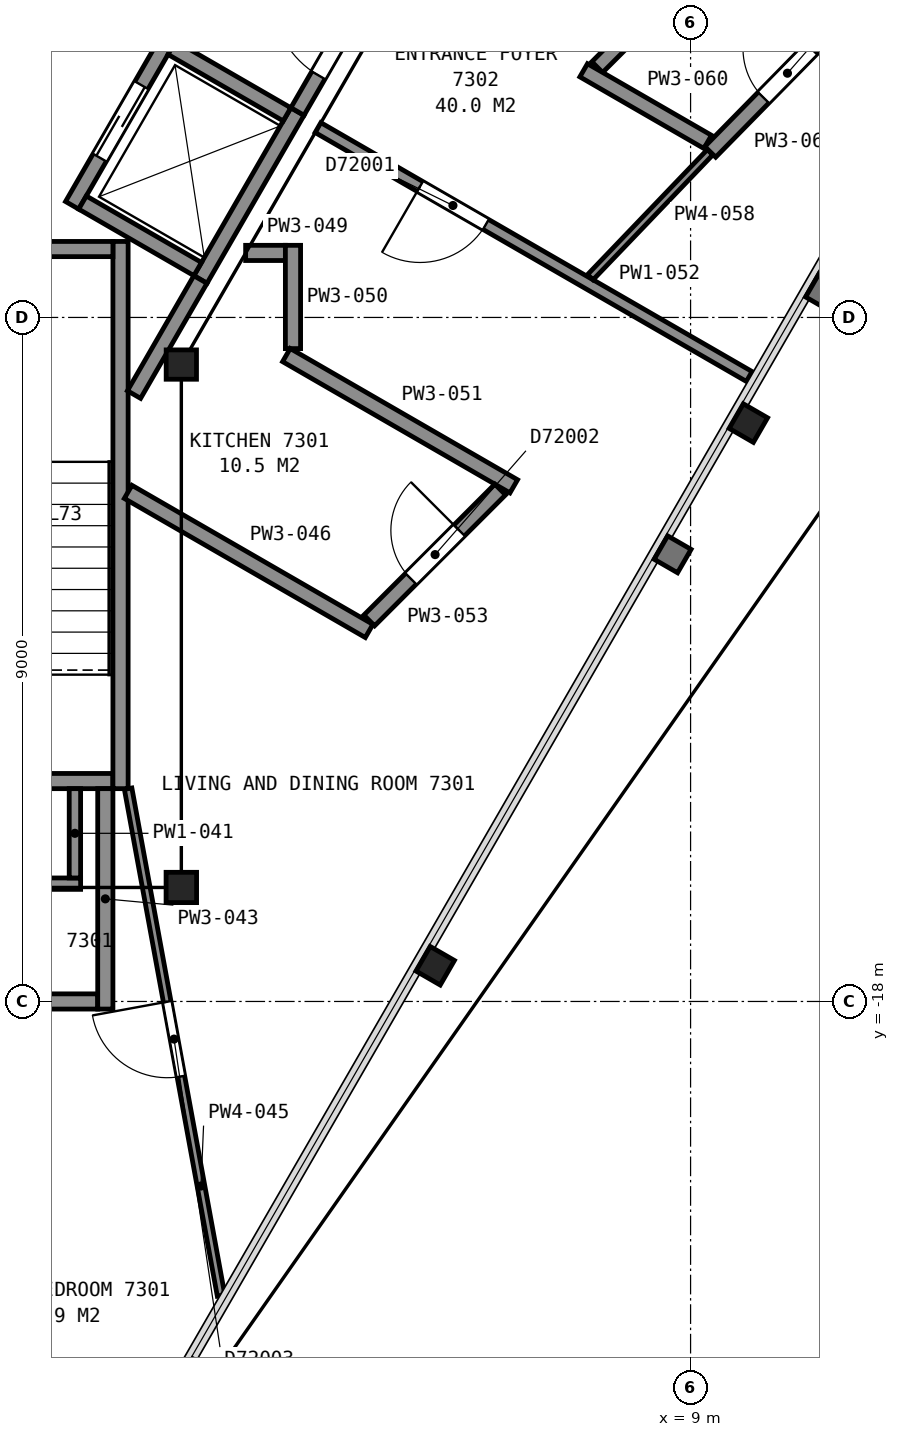
"""IFC4 building model, lengths in metres.
Left out: names, types, materials, properties, quantities, classifications, styles, units other than length and angle.
Written with IfcOpenShell. Run it as: python <this file> out.ifc"""

import sys

from ifc_helpers import new_model, si_unit, direction, frame, frame_2d, origin, origin_2d, place, context, subcontext, project, spatial, rectangle, i_section, extrude, element, fill, save


model = new_model("IFC4")
c1 = context("Model", 3, precision=1e-05, world=origin(), true_north=direction((0.0, 1.0)))
c2 = subcontext(c1, "Body", "Model", "MODEL_VIEW")
j1 = project(units=[si_unit("LENGTHUNIT", "METRE"), si_unit("PLANEANGLEUNIT", "RADIAN")], contexts=[c1])
p1 = place(None, origin())
s1 = spatial("IfcSite", under=j1, at=p1, CompositionType="ELEMENT")
p2 = place(p1, origin())
s2 = spatial("IfcBuilding", under=s1, at=p2, CompositionType="ELEMENT")
p3 = place(p2, frame((0.0, 0.0, 289.9)))
s3 = spatial("IfcBuildingStorey", under=s2, at=p3, CompositionType="ELEMENT", Elevation=289.9)
for number, where, z_axis, x_axis in (
    (1, (5.64, -17.53, 0.0), (0.0, 0.0, 1.0), (-0.5, -0.866, 0.0)),
    (2, (9.76, -10.39, 0.0), (0.0, 0.0, 1.0), (-0.5, -0.866, 0.0)),
):
    element("IfcColumn", number, at=place(p3, frame(where, z_axis=z_axis, x_axis=x_axis)), inside=s3, PredefinedType="COLUMN", context=c2, shape_type="SweptSolid", body=[
        extrude(i_section(OverallWidth=0.373, OverallDepth=0.368, WebThickness=0.015, FlangeThickness=0.024, FilletRadius=0.015, at=origin_2d()), origin(), (0.0, 0.0, 1.0), 3.7),
    ])
p4 = place(p3, frame((2.3, -16.5, 0.0), z_axis=(0.0, 0.0, 1.0), x_axis=(-1.0, 0.0, 0.0)))
e3 = element("IfcColumn", 3, at=p4, inside=s3, PredefinedType="COLUMN", context=c2, shape_type="SweptSolid", body=[
    extrude(i_section(OverallWidth=0.401, OverallDepth=0.399, WebThickness=0.025, FlangeThickness=0.04, FilletRadius=0.015, at=origin_2d()), origin(), (0.0, 0.0, 1.0), 3.7),
])
p5 = place(p3, frame((2.3, -9.62, 0.0), z_axis=(0.0, 0.0, 1.0), x_axis=(1.0, 0.0, 0.0)))
e4 = element("IfcColumn", 4, at=p5, inside=s3, PredefinedType="COLUMN", context=c2, shape_type="SweptSolid", body=[
    extrude(i_section(OverallWidth=0.399, OverallDepth=0.386, WebThickness=0.021, FlangeThickness=0.033, FilletRadius=0.015, at=origin_2d()), origin(), (0.0, 0.0, 1.0), 3.7),
])
p6 = place(p3, frame((-1.4, -15.1, 0.0), z_axis=(0.0, 0.0, 1.0), x_axis=(1.0, 0.0, 0.0)))
e5 = element("IfcWall", 5, at=p6, inside=s3, PredefinedType="PARTITIONING", context=c2, shape_type="SweptSolid", body=[
    extrude(rectangle(XDim=2.8, YDim=0.2, at=frame_2d((1.4, 0.0))), origin(), (0.0, 0.0, 1.0), 3.45),
])
p7 = place(p6, frame((0.85, 0.0, 0.0)))
e6 = element("IfcOpeningElement", 6, at=p7, cuts=e5, PredefinedType="OPENING", context=c2, shape_type="SweptSolid", body=[
    extrude(rectangle(XDim=1.1, YDim=2.1, at=frame_2d((0.55, 1.05))), frame((0.0, 0.11, 0.0), z_axis=(0.0, -1.0, 0.0), x_axis=(1.0, 0.0, 0.0)), (0.0, 0.0, 1.0), 0.22),
])
p8 = place(p3, frame((1.5, -8.0, 0.0), z_axis=(0.0, 0.0, 1.0), x_axis=(0.0, -1.0, 0.0)))
e7 = element("IfcWall", 7, at=p8, inside=s3, PredefinedType="PARTITIONING", context=c2, shape_type="SweptSolid", body=[
    extrude(rectangle(XDim=7.2, YDim=0.2, at=frame_2d((3.6, 0.0))), origin(), (0.0, 0.0, 1.0), 3.45),
])
p9 = place(p3, frame((-1.4, -8.1, 0.0), z_axis=(0.0, 0.0, 1.0), x_axis=(1.0, 0.0, 0.0)))
e8 = element("IfcWall", 8, at=p9, inside=s3, PredefinedType="PARTITIONING", context=c2, shape_type="SweptSolid", body=[
    extrude(rectangle(XDim=2.8, YDim=0.2, at=frame_2d((1.4, 0.0))), origin(), (0.0, 0.0, 1.0), 3.45),
])
p10 = place(p3, frame((2.552, -8.5, 0.0), z_axis=(0.0, 0.0, 1.0), x_axis=(0.499990435942, 0.866030925526, 0.0)))
e9 = element("IfcWall", 9, at=p10, inside=s3, PredefinedType="PARTITIONING", context=c2, shape_type="SweptSolid", body=[
    extrude(rectangle(XDim=2.55, YDim=0.2, at=frame_2d((1.275, 0.0))), origin(), (0.0, 0.0, 1.0), 3.7),
])
p11 = place(p3, frame((0.863, -7.525, 0.0), z_axis=(0.0, 0.0, 1.0), x_axis=(0.499990435942, 0.866030925526, 0.0)))
e10 = element("IfcWall", 10, at=p11, inside=s3, PredefinedType="PARTITIONING", context=c2, shape_type="SweptSolid", body=[
    extrude(rectangle(XDim=2.55, YDim=0.2, at=frame_2d((1.275, 0.0))), origin(), (0.0, 0.0, 1.0), 3.7),
])
p12 = place(p11, frame((0.725, 0.0, 0.0)))
e11 = element("IfcOpeningElement", 11, at=p12, cuts=e10, PredefinedType="OPENING", context=c2, shape_type="SweptSolid", body=[
    extrude(rectangle(XDim=1.1, YDim=2.1, at=frame_2d((0.55, 1.05))), frame((0.0, 0.11, 0.0), z_axis=(0.0, -1.0, 0.0), x_axis=(1.0, 0.0, 0.0)), (0.0, 0.0, 1.0), 0.22),
])
for number, where, z_axis, x_axis in (
    (12, (3.69, -6.328, 0.0), (0.0, 0.0, 1.0), (-0.866, 0.5, 0.0)),
    (13, (2.515, -8.363, 0.0), (0.0, 0.0, 1.0), (-0.866, 0.5, 0.0)),
):
    element("IfcWall", number, at=place(p3, frame(where, z_axis=z_axis, x_axis=x_axis)), inside=s3, PredefinedType="PARTITIONING", context=c2, shape_type="SweptSolid", body=[
        extrude(rectangle(XDim=1.75, YDim=0.2, at=frame_2d((0.875, 0.0))), origin(), (0.0, 0.0, 1.0), 3.7),
    ])
p13 = place(p3, frame((1.677, -10.015, 0.0), z_axis=(0.0, 0.0, 1.0), x_axis=(0.49983532306, 0.866120459187, 0.0)))
e14 = element("IfcWall", 14, at=p13, inside=s3, PredefinedType="PARTITIONING", context=c2, shape_type="SweptSolid", body=[
    extrude(rectangle(XDim=1.748, YDim=0.2, at=frame_2d((0.874, 0.0))), origin(), (0.0, 0.0, 1.0), 3.45),
])
p14 = place(p3, frame((3.828, -6.29, 0.0), z_axis=(0.0, 0.0, 1.0), x_axis=(0.499979739078, 0.866037101117, 0.0)))
e15 = element("IfcWall", 15, at=p14, inside=s3, PredefinedType="PARTITIONING", context=c2, shape_type="SweptSolid", body=[
    extrude(rectangle(XDim=11.363, YDim=0.2, at=frame_2d((5.681, 0.0))), origin(), (0.0, 0.0, 1.0), 3.45),
])
p15 = place(p14, frame((0.55, 0.0, 0.0)))
e16 = element("IfcOpeningElement", 16, at=p15, cuts=e15, PredefinedType="OPENING", context=c2, shape_type="SweptSolid", body=[
    extrude(rectangle(XDim=1.2, YDim=2.1, at=frame_2d((0.6, 1.05))), frame((0.0, 0.11, 0.0), z_axis=(0.0, -1.0, 0.0), x_axis=(1.0, 0.0, 0.0)), (0.0, 0.0, 1.0), 0.22),
])
p16 = place(p3, frame((-1.65, -16.45, 0.0), z_axis=(0.0, 0.0, 1.0), x_axis=(1.0, 0.0, 0.0)))
e17 = element("IfcWall", 17, at=p16, inside=s3, PredefinedType="PARTITIONING", context=c2, shape_type="SweptSolid", body=[
    extrude(rectangle(XDim=2.625, YDim=0.15, at=frame_2d((1.312, 0.0))), origin(), (0.0, 0.0, 1.0), 2.723),
])
p17 = place(p3, frame((-1.211, -18.0, 0.0), z_axis=(0.0, 0.0, 1.0), x_axis=(1.0, 0.0, 0.0)))
e18 = element("IfcWall", 18, at=p17, inside=s3, PredefinedType="PARTITIONING", context=c2, shape_type="SweptSolid", body=[
    extrude(rectangle(XDim=2.411, YDim=0.2, at=frame_2d((1.206, 0.0))), origin(), (0.0, 0.0, 1.0), 2.723),
])
p18 = place(p17, frame((0.825, 0.0, 0.0)))
e19 = element("IfcOpeningElement", 19, at=p18, cuts=e18, PredefinedType="OPENING", context=c2, shape_type="SweptSolid", body=[
    extrude(rectangle(XDim=0.8, YDim=2.1, at=frame_2d((0.4, 1.05))), frame((0.0, 0.11, 0.0), z_axis=(0.0, -1.0, 0.0), x_axis=(1.0, 0.0, 0.0)), (0.0, 0.0, 1.0), 0.22),
])
p19 = place(p3, frame((0.9, -16.375, 0.0), z_axis=(0.0, 0.0, 1.0), x_axis=(0.0, 1.0, 0.0)))
e20 = element("IfcWall", 20, at=p19, inside=s3, PredefinedType="PARTITIONING", context=c2, shape_type="SweptSolid", body=[
    extrude(rectangle(XDim=1.175, YDim=0.15, at=frame_2d((0.587, 0.0))), origin(), (0.0, 0.0, 1.0), 2.723),
])
p20 = place(p3, frame((1.3, -18.1, 0.0), z_axis=(0.0, 0.0, 1.0), x_axis=(0.0, 1.0, 0.0)))
e21 = element("IfcWall", 21, at=p20, inside=s3, PredefinedType="PARTITIONING", context=c2, shape_type="SweptSolid", body=[
    extrude(rectangle(XDim=2.9, YDim=0.2, at=frame_2d((1.45, 0.0))), origin(), (0.0, 0.0, 1.0), 2.723),
])
p21 = place(p3, frame((2.823, -21.869, 0.0), z_axis=(0.0, 0.0, 1.0), x_axis=(-0.180317418333, 0.983608473248, 0.0)))
e22 = element("IfcWall", 22, at=p21, inside=s3, PredefinedType="PARTITIONING", context=c2, shape_type="SweptSolid", body=[
    extrude(rectangle(XDim=6.781, YDim=0.1, at=frame_2d((3.39, 0.0))), origin(), (0.0, 0.0, 1.0), 2.723),
])
p22 = place(p21, frame((2.931, 0.0, 0.0)))
e23 = element("IfcOpeningElement", 23, at=p22, cuts=e22, PredefinedType="OPENING", context=c2, shape_type="SweptSolid", body=[
    extrude(rectangle(XDim=1.0, YDim=2.1, at=frame_2d((0.5, 1.05))), frame((0.0, 0.06, 0.0), z_axis=(0.0, -1.0, 0.0), x_axis=(1.0, 0.0, 0.0)), (0.0, 0.0, 1.0), 0.12),
])
p23 = place(p3, frame((1.6, -11.295, 0.0), z_axis=(0.0, 0.0, 1.0), x_axis=(0.866067869506, -0.499926439998, 0.0)))
e24 = element("IfcWall", 24, at=p23, inside=s3, PredefinedType="PARTITIONING", context=c2, shape_type="SweptSolid", body=[
    extrude(rectangle(XDim=3.661, YDim=0.2, at=frame_2d((1.83, 0.0))), origin(), (0.0, 0.0, 1.0), 2.723),
])
p24 = place(p3, frame((3.146, -8.151, 0.0), z_axis=(0.0, 0.0, 1.0), x_axis=(1.0, 0.0, 0.0)))
e25 = element("IfcWall", 25, at=p24, inside=s3, PredefinedType="PARTITIONING", context=c2, shape_type="SweptSolid", body=[
    extrude(rectangle(XDim=0.523, YDim=0.2, at=frame_2d((0.261, 0.0))), origin(), (0.0, 0.0, 1.0), 2.723),
])
p25 = place(p3, frame((3.769, -9.41, 0.0), z_axis=(0.0, 0.0, 1.0), x_axis=(0.0, 1.0, 0.0)))
e26 = element("IfcWall", 26, at=p25, inside=s3, PredefinedType="PARTITIONING", context=c2, shape_type="SweptSolid", body=[
    extrude(rectangle(XDim=1.359, YDim=0.2, at=frame_2d((0.679, 0.0))), origin(), (0.0, 0.0, 1.0), 2.723),
])
p26 = place(p3, frame((3.682, -9.495, 0.0), z_axis=(0.0, 0.0, 1.0), x_axis=(0.866046690806, -0.499963127985, 0.0)))
e27 = element("IfcWall", 27, at=p26, inside=s3, PredefinedType="PARTITIONING", context=c2, shape_type="SweptSolid", body=[
    extrude(rectangle(XDim=3.454, YDim=0.2, at=frame_2d((1.727, 0.0))), origin(), (0.0, 0.0, 1.0), 2.723),
])
p27 = place(p3, frame((9.772, -9.777, 0.0), z_axis=(0.0, 0.0, 1.0), x_axis=(-0.866083818164, 0.499898809675, 0.0)))
e28 = element("IfcWall", 28, at=p27, inside=s3, PredefinedType="PARTITIONING", context=c2, shape_type="SweptSolid", body=[
    extrude(rectangle(XDim=6.551, YDim=0.15, at=frame_2d((3.275, 0.0))), origin(), (0.0, 0.0, 1.0), 2.723),
])
p28 = place(p27, frame((4.001, 0.0, 0.0)))
e29 = element("IfcOpeningElement", 29, at=p28, cuts=e28, PredefinedType="OPENING", context=c2, shape_type="SweptSolid", body=[
    extrude(rectangle(XDim=1.0, YDim=2.1, at=frame_2d((0.5, 1.05))), frame((0.0, 0.085, 0.0), z_axis=(0.0, -1.0, 0.0), x_axis=(1.0, 0.0, 0.0)), (0.0, 0.0, 1.0), 0.17),
])
p29 = place(p3, frame((4.772, -12.987, 0.0), z_axis=(0.0, 0.0, 1.0), x_axis=(0.707106781187, 0.707106781187, 0.0)))
e30 = element("IfcWall", 30, at=p29, inside=s3, PredefinedType="PARTITIONING", context=c2, shape_type="SweptSolid", body=[
    extrude(rectangle(XDim=2.436, YDim=0.2, at=frame_2d((1.218, 0.0))), origin(), (0.0, 0.0, 1.0), 2.723),
])
p30 = place(p29, frame((0.775, 0.0, 0.0)))
e31 = element("IfcOpeningElement", 31, at=p30, cuts=e30, PredefinedType="OPENING", context=c2, shape_type="SweptSolid", body=[
    extrude(rectangle(XDim=0.9, YDim=2.1, at=frame_2d((0.45, 1.05))), frame((0.0, 0.11, 0.0), z_axis=(0.0, -1.0, 0.0), x_axis=(1.0, 0.0, 0.0)), (0.0, 0.0, 1.0), 0.22),
])
p31 = place(p3, frame((7.681, -8.47, 0.0), z_axis=(0.0, 0.0, 1.0), x_axis=(0.691774963189, 0.722113149239, 0.0)))
e32 = element("IfcWall", 32, at=p31, inside=s3, PredefinedType="PARTITIONING", context=c2, shape_type="SweptSolid", body=[
    extrude(rectangle(XDim=2.277, YDim=0.1, at=frame_2d((1.139, 0.0))), origin(), (0.0, 0.0, 1.0), 2.723),
])
p32 = place(p3, frame((7.772, -5.706, 0.0), z_axis=(0.0, 0.0, 1.0), x_axis=(0.707106781187, 0.707106781187, 0.0)))
e33 = element("IfcWall", 33, at=p32, inside=s3, PredefinedType="PARTITIONING", context=c2, shape_type="SweptSolid", body=[
    extrude(rectangle(XDim=1.044, YDim=0.2, at=frame_2d((0.522, 0.0))), origin(), (0.0, 0.0, 1.0), 2.723),
])
p33 = place(p3, frame((7.594, -5.748, 0.0), z_axis=(0.0, 0.0, 1.0), x_axis=(0.866049635583, -0.499958026946, 0.0)))
e34 = element("IfcWall", 34, at=p33, inside=s3, PredefinedType="PARTITIONING", context=c2, shape_type="SweptSolid", body=[
    extrude(rectangle(XDim=1.884, YDim=0.2, at=frame_2d((0.942, 0.0))), origin(), (0.0, 0.0, 1.0), 2.723),
])
p34 = place(p3, frame((9.259, -6.821, 0.0), z_axis=(0.0, 0.0, 1.0), x_axis=(0.700360124324, 0.713789672282, 0.0)))
e35 = element("IfcWall", 35, at=p34, inside=s3, PredefinedType="PARTITIONING", context=c2, shape_type="SweptSolid", body=[
    extrude(rectangle(XDim=2.654, YDim=0.2, at=frame_2d((1.327, 0.0))), origin(), (0.0, 0.0, 1.0), 2.723),
])
p35 = place(p34, frame((1.0, 0.0, 0.0)))
e36 = element("IfcOpeningElement", 36, at=p35, cuts=e35, PredefinedType="OPENING", context=c2, shape_type="SweptSolid", body=[
    extrude(rectangle(XDim=0.9, YDim=2.1, at=frame_2d((0.45, 1.05))), frame((0.0, 0.11, 0.0), z_axis=(0.0, -1.0, 0.0), x_axis=(1.0, 0.0, 0.0)), (0.0, 0.0, 1.0), 0.22),
])
p36 = place(p12, origin())
e37 = element("IfcDoor", 37, at=p36, inside=s3, OperationType="SLIDING_TO_LEFT", PredefinedType="DOOR", context=c2, shape_type="SweptSolid", body=[
    extrude(rectangle(XDim=1.1, YDim=2.1, at=frame_2d((0.55, 1.05))), frame((0.0, 0.025, 0.0), z_axis=(0.0, -1.0, 0.0), x_axis=(1.0, 0.0, 0.0)), (0.0, 0.0, 1.0), 0.05),
])
fill(e11, e37)
p37 = place(p15, origin())
e38 = element("IfcDoor", 38, at=p37, inside=s3, OperationType="SINGLE_SWING_RIGHT", PredefinedType="DOOR", context=c2, shape_type="SweptSolid", body=[
    extrude(rectangle(XDim=1.2, YDim=2.1, at=frame_2d((0.6, 1.05))), frame((0.0, 0.025, 0.0), z_axis=(0.0, -1.0, 0.0), x_axis=(1.0, 0.0, 0.0)), (0.0, 0.0, 1.0), 0.05),
])
fill(e16, e38)
p38 = place(p22, origin())
e39 = element("IfcDoor", 39, at=p38, inside=s3, OperationType="SINGLE_SWING_RIGHT", PredefinedType="DOOR", context=c2, shape_type="SweptSolid", body=[
    extrude(rectangle(XDim=1.0, YDim=2.1, at=frame_2d((0.5, 1.05))), frame((0.0, 0.025, 0.0), z_axis=(0.0, -1.0, 0.0), x_axis=(1.0, 0.0, 0.0)), (0.0, 0.0, 1.0), 0.05),
])
fill(e23, e39)
p39 = place(p28, origin())
e40 = element("IfcDoor", 40, at=p39, inside=s3, OperationType="SINGLE_SWING_RIGHT", PredefinedType="DOOR", context=c2, shape_type="SweptSolid", body=[
    extrude(rectangle(XDim=1.0, YDim=2.1, at=frame_2d((0.5, 1.05))), frame((0.0, 0.025, 0.0), z_axis=(0.0, -1.0, 0.0), x_axis=(1.0, 0.0, 0.0)), (0.0, 0.0, 1.0), 0.05),
])
fill(e29, e40)
p40 = place(p30, origin())
e41 = element("IfcDoor", 41, at=p40, inside=s3, OperationType="SINGLE_SWING_RIGHT", PredefinedType="DOOR", context=c2, shape_type="SweptSolid", body=[
    extrude(rectangle(XDim=0.9, YDim=2.1, at=frame_2d((0.45, 1.05))), frame((0.0, 0.025, 0.0), z_axis=(0.0, -1.0, 0.0), x_axis=(1.0, 0.0, 0.0)), (0.0, 0.0, 1.0), 0.05),
])
fill(e31, e41)
p41 = place(p35, origin())
e42 = element("IfcDoor", 42, at=p41, inside=s3, OperationType="SINGLE_SWING_RIGHT", PredefinedType="DOOR", context=c2, shape_type="SweptSolid", body=[
    extrude(rectangle(XDim=0.9, YDim=2.1, at=frame_2d((0.45, 1.05))), frame((0.0, 0.025, 0.0), z_axis=(0.0, -1.0, 0.0), x_axis=(1.0, 0.0, 0.0)), (0.0, 0.0, 1.0), 0.05),
])
fill(e36, e42)
save(model, sys.argv[1])
